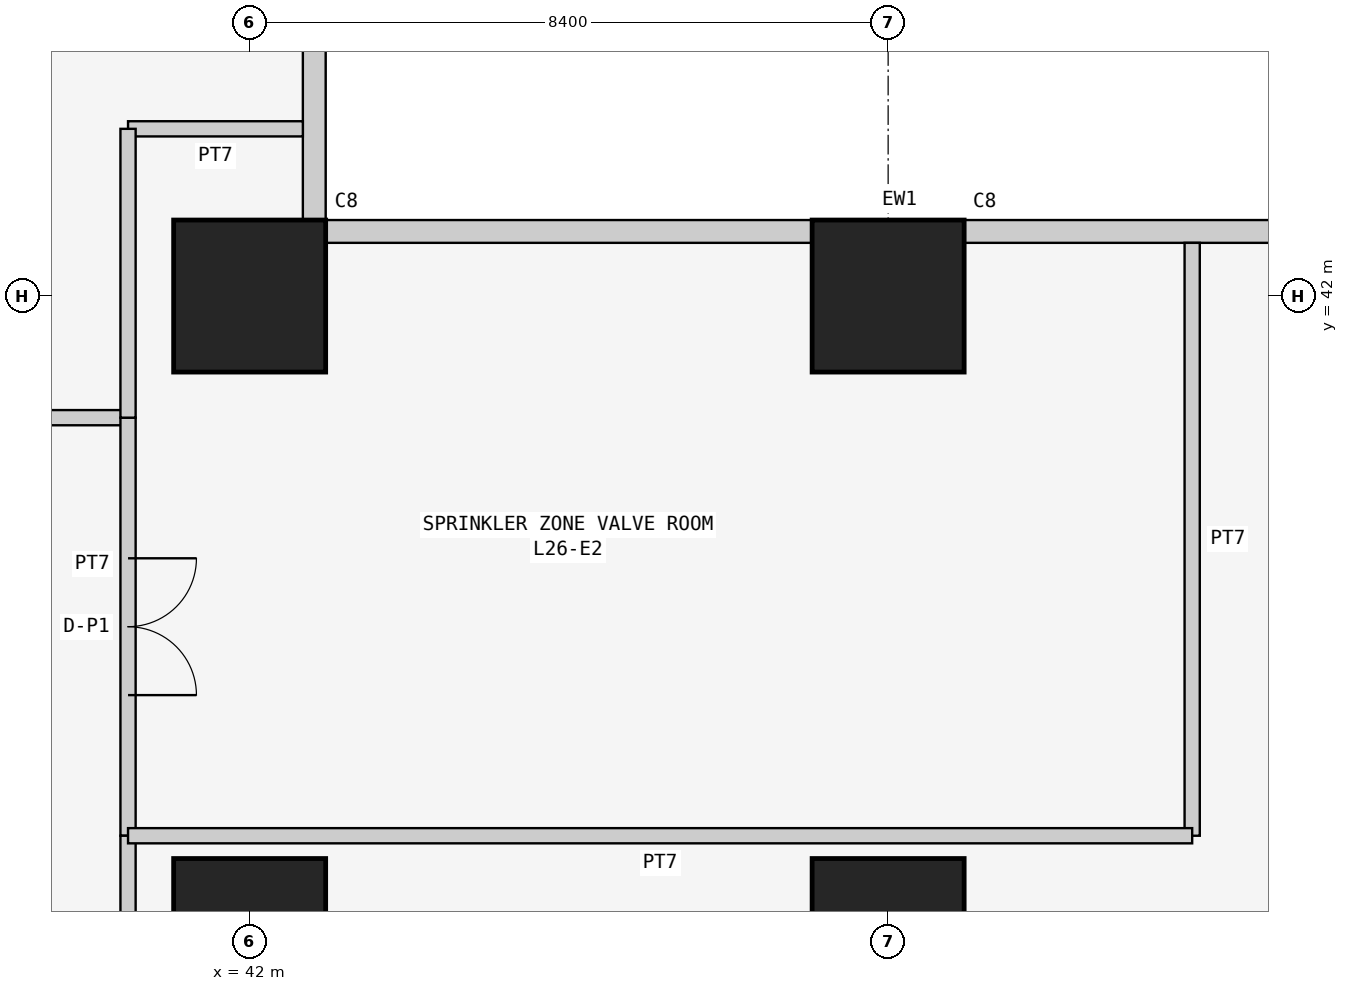
"""IFC4 building model, lengths in metres.
Left out: names, types, materials, properties, quantities, classifications, styles, units other than length and angle.
Written with IfcOpenShell. Run it as: python <this file> out.ifc"""

import sys

from ifc_helpers import new_model, si_unit, direction, frame, frame_2d, origin, origin_2d, place, context, subcontext, project, spatial, rectangle, extrude, element, fill, save


model = new_model("IFC4")
c1 = context("Model", 3, precision=1e-05, world=origin(), true_north=direction((0.0, 1.0)))
c2 = subcontext(c1, "Body", "Model", "MODEL_VIEW")
j1 = project(units=[si_unit("LENGTHUNIT", "METRE"), si_unit("PLANEANGLEUNIT", "RADIAN")], contexts=[c1])
p1 = place(None, origin())
s1 = spatial("IfcSite", under=j1, at=p1, CompositionType="ELEMENT")
p2 = place(p1, origin())
s2 = spatial("IfcBuilding", under=s1, at=p2, CompositionType="ELEMENT")
p3 = place(p2, frame((0.0, 0.0, 102.9)))
s3 = spatial("IfcBuildingStorey", under=s2, at=p3, CompositionType="ELEMENT", Elevation=102.9)
for number, where, z_axis, x_axis in (
    (1, (42.0, 33.6, 0.0), (0.0, 0.0, 1.0), (1.0, 0.0, 0.0)),
    (2, (42.0, 42.0, 0.0), (0.0, 0.0, 1.0), (1.0, 0.0, 0.0)),
    (3, (50.4, 33.6, 0.0), (0.0, 0.0, 1.0), (1.0, 0.0, 0.0)),
    (4, (50.4, 42.0, 0.0), (0.0, 0.0, 1.0), (1.0, 0.0, 0.0)),
):
    element("IfcColumn", number, at=place(p3, frame(where, z_axis=z_axis, x_axis=x_axis)), inside=s3, PredefinedType="COLUMN", context=c2, shape_type="SweptSolid", body=[
        extrude(rectangle(XDim=2.0, YDim=2.0, at=origin_2d()), origin(), (0.0, 0.0, 1.0), 6.0),
    ])
p4 = place(p3, frame((58.4, 42.85, 0.0), z_axis=(0.0, 0.0, 1.0), x_axis=(-1.0, 0.0, 0.0)))
e5 = element("IfcWall", 5, at=p4, inside=s3, PredefinedType="SOLIDWALL", context=c2, shape_type="SweptSolid", body=[
    extrude(rectangle(XDim=15.7, YDim=0.3, at=frame_2d((7.85, 0.0))), origin(), (0.0, 0.0, 1.0), 5.85),
])
p5 = place(p3, frame((42.85, 43.0, 0.0), z_axis=(0.0, 0.0, 1.0), x_axis=(0.0, 1.0, 0.0)))
e6 = element("IfcWall", 6, at=p5, inside=s3, PredefinedType="SOLIDWALL", context=c2, shape_type="SweptSolid", body=[
    extrude(rectangle(XDim=15.4, YDim=0.3, at=frame_2d((7.7, 0.0))), origin(), (0.0, 0.0, 1.0), 5.85),
])
p6 = place(p3, frame((34.9, 40.4, 0.0), z_axis=(0.0, 0.0, 1.0), x_axis=(1.0, 0.0, 0.0)))
e7 = element("IfcWall", 7, at=p6, inside=s3, PredefinedType="PARTITIONING", context=c2, shape_type="SweptSolid", body=[
    extrude(rectangle(XDim=5.5, YDim=0.2, at=frame_2d((2.75, 0.0))), origin(), (0.0, 0.0, 1.0), 5.85),
])
p7 = place(p6, frame((1.85, 0.0, 0.0)))
e8 = element("IfcOpeningElement", 8, at=p7, cuts=e7, PredefinedType="OPENING", context=c2, shape_type="SweptSolid", body=[
    extrude(rectangle(XDim=1.8, YDim=2.4, at=frame_2d((0.9, 1.2))), frame((0.0, 0.11, 0.0), z_axis=(0.0, -1.0, 0.0), x_axis=(1.0, 0.0, 0.0)), (0.0, 0.0, 1.0), 0.22),
])
p8 = place(p3, frame((40.4, 40.4, 0.0), z_axis=(0.0, 0.0, 1.0), x_axis=(0.0, -1.0, 0.0)))
e9 = element("IfcWall", 9, at=p8, inside=s3, PredefinedType="PARTITIONING", context=c2, shape_type="SweptSolid", body=[
    extrude(rectangle(XDim=5.5, YDim=0.2, at=frame_2d((2.75, 0.0))), origin(), (0.0, 0.0, 1.0), 5.85),
])
p9 = place(p8, frame((1.85, 0.0, 0.0)))
e10 = element("IfcOpeningElement", 10, at=p9, cuts=e9, PredefinedType="OPENING", context=c2, shape_type="SweptSolid", body=[
    extrude(rectangle(XDim=1.8, YDim=2.4, at=frame_2d((0.9, 1.2))), frame((0.0, 0.11, 0.0), z_axis=(0.0, -1.0, 0.0), x_axis=(1.0, 0.0, 0.0)), (0.0, 0.0, 1.0), 0.22),
])
p10 = place(p3, frame((40.4, 34.9, 0.0), z_axis=(0.0, 0.0, 1.0), x_axis=(0.0, -1.0, 0.0)))
e11 = element("IfcWall", 11, at=p10, inside=s3, PredefinedType="PARTITIONING", context=c2, shape_type="SweptSolid", body=[
    extrude(rectangle(XDim=2.7, YDim=0.2, at=frame_2d((1.35, 0.0))), origin(), (0.0, 0.0, 1.0), 5.85),
])
p11 = place(p3, frame((42.7, 44.2, 0.0), z_axis=(0.0, 0.0, 1.0), x_axis=(-1.0, 0.0, 0.0)))
e12 = element("IfcWall", 12, at=p11, inside=s3, PredefinedType="PARTITIONING", context=c2, shape_type="SweptSolid", body=[
    extrude(rectangle(XDim=2.3, YDim=0.2, at=frame_2d((1.15, 0.0))), origin(), (0.0, 0.0, 1.0), 5.85),
])
p12 = place(p3, frame((40.4, 44.2, 0.0), z_axis=(0.0, 0.0, 1.0), x_axis=(0.0, -1.0, 0.0)))
e13 = element("IfcWall", 13, at=p12, inside=s3, PredefinedType="PARTITIONING", context=c2, shape_type="SweptSolid", body=[
    extrude(rectangle(XDim=3.8, YDim=0.2, at=frame_2d((1.9, 0.0))), origin(), (0.0, 0.0, 1.0), 5.85),
])
p13 = place(p3, frame((54.4, 42.7, 0.0), z_axis=(0.0, 0.0, 1.0), x_axis=(0.0, -1.0, 0.0)))
e14 = element("IfcWall", 14, at=p13, inside=s3, PredefinedType="PARTITIONING", context=c2, shape_type="SweptSolid", body=[
    extrude(rectangle(XDim=7.8, YDim=0.2, at=frame_2d((3.9, 0.0))), origin(), (0.0, 0.0, 1.0), 5.85),
])
p14 = place(p3, frame((54.4, 34.9, 0.0), z_axis=(0.0, 0.0, 1.0), x_axis=(-1.0, 0.0, 0.0)))
e15 = element("IfcWall", 15, at=p14, inside=s3, PredefinedType="PARTITIONING", context=c2, shape_type="SweptSolid", body=[
    extrude(rectangle(XDim=14.0, YDim=0.2, at=frame_2d((7.0, 0.0))), origin(), (0.0, 0.0, 1.0), 5.85),
])
p15 = place(p9, origin())
e16 = element("IfcDoor", 16, at=p15, inside=s3, OperationType="DOUBLE_DOOR_SINGLE_SWING", PredefinedType="DOOR", context=c2, shape_type="SweptSolid", body=[
    extrude(rectangle(XDim=1.8, YDim=2.4, at=frame_2d((0.9, 1.2))), frame((0.0, 0.025, 0.0), z_axis=(0.0, -1.0, 0.0), x_axis=(1.0, 0.0, 0.0)), (0.0, 0.0, 1.0), 0.05),
])
fill(e10, e16)
save(model, sys.argv[1])
